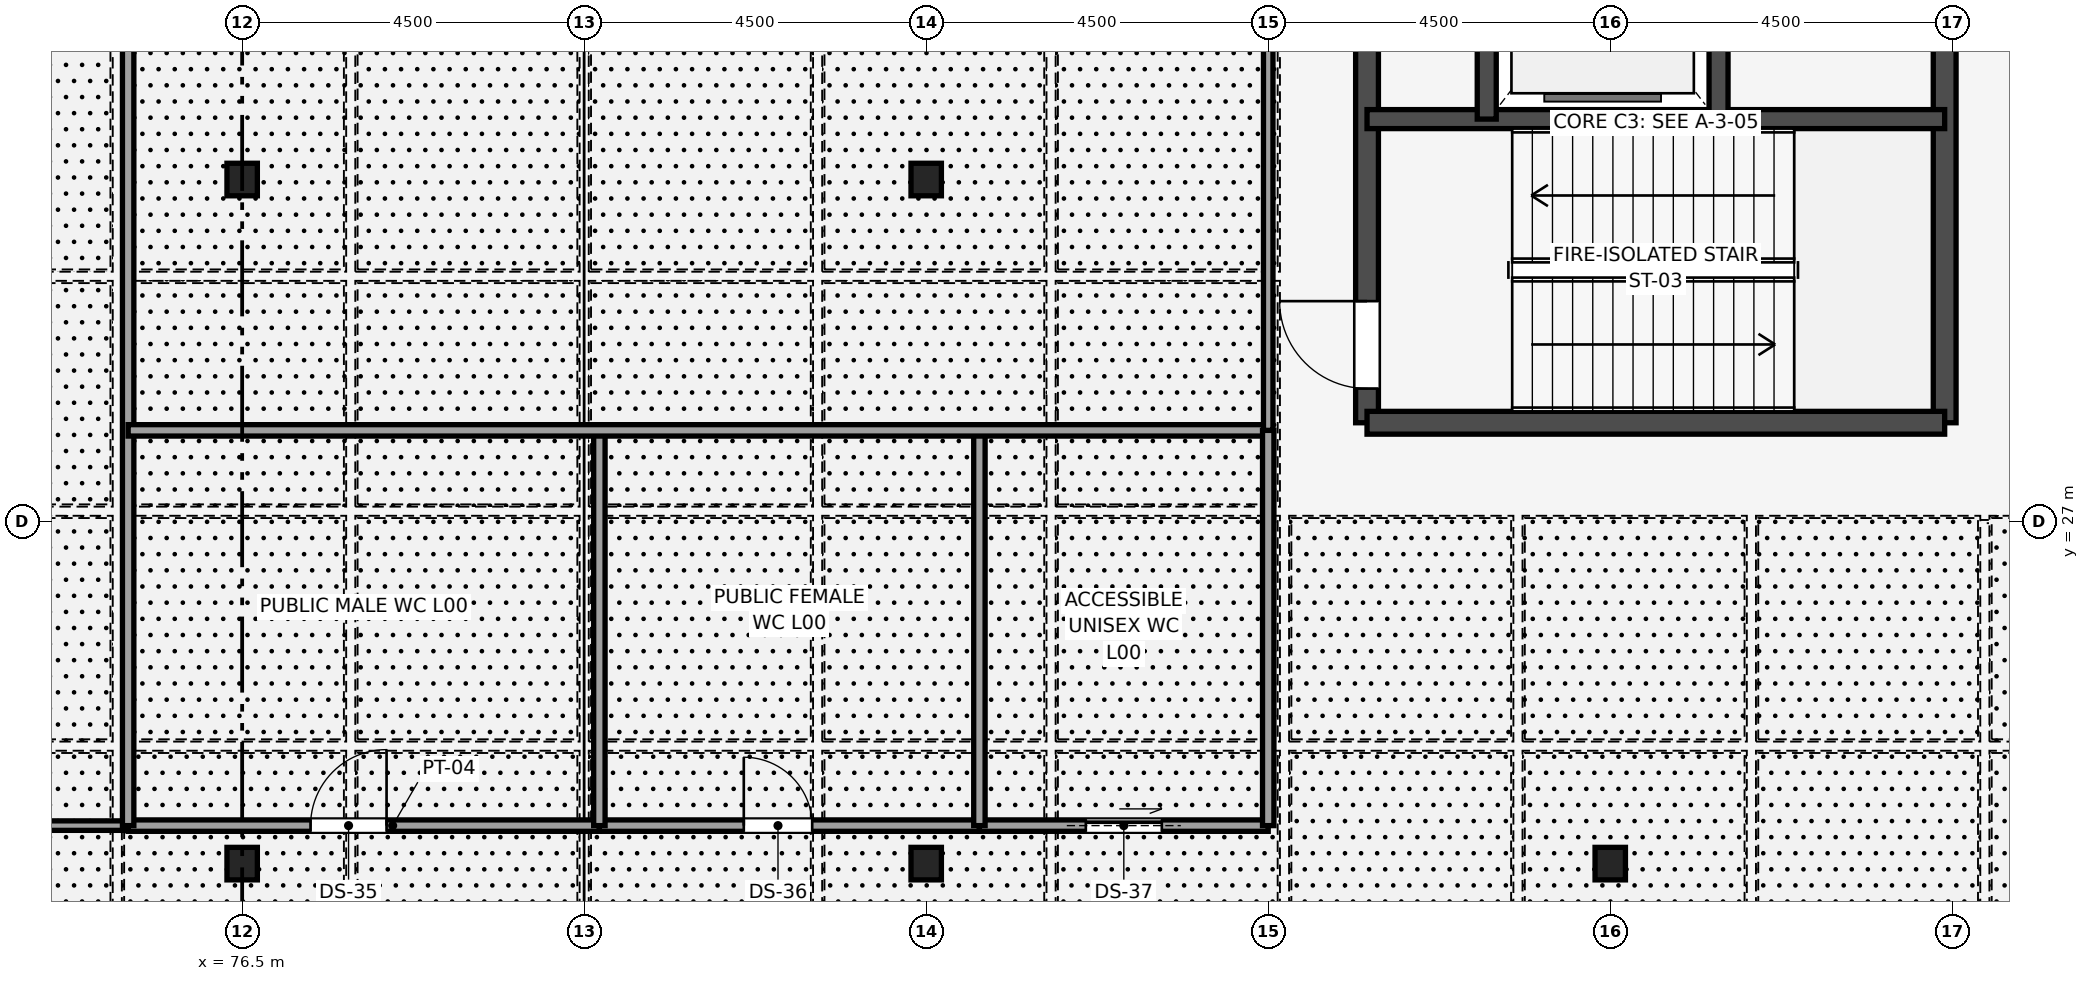
"""IFC4 building model, lengths in metres.
Left out: names, types, materials, properties, quantities, classifications, styles, units other than length and angle.
Written with IfcOpenShell. Run it as: python <this file> out.ifc"""

import sys

from ifc_helpers import new_model, si_unit, direction, frame, frame_2d, origin, origin_2d, place, context, subcontext, project, spatial, rectangle, i_section, extrude, element, fill, save


model = new_model("IFC4")
c1 = context("Model", 3, precision=1e-05, world=origin(), true_north=direction((0.0, 1.0)))
c2 = subcontext(c1, "Body", "Model", "MODEL_VIEW")
j1 = project(units=[si_unit("LENGTHUNIT", "METRE"), si_unit("PLANEANGLEUNIT", "RADIAN")], contexts=[c1])
p1 = place(None, origin())
s1 = spatial("IfcSite", under=j1, at=p1, CompositionType="ELEMENT")
p2 = place(p1, origin())
s2 = spatial("IfcBuilding", under=s1, at=p2, CompositionType="ELEMENT")
p3 = place(p2, origin())
s3 = spatial("IfcBuildingStorey", under=s2, at=p3, CompositionType="ELEMENT", Elevation=0.0)
for number, where, z_axis, x_axis in (
    (1, (76.5, 22.5, 0.0), (0.0, 0.0, 1.0), (1.0, 0.0, 0.0)),
    (2, (76.5, 31.5, 0.0), (0.0, 0.0, 1.0), (1.0, 0.0, 0.0)),
    (3, (85.5, 22.5, 0.0), (0.0, 0.0, 1.0), (1.0, 0.0, 0.0)),
    (4, (85.5, 31.5, 0.0), (0.0, 0.0, 1.0), (1.0, 0.0, 0.0)),
    (5, (94.5, 22.5, 0.0), (0.0, 0.0, 1.0), (1.0, 0.0, 0.0)),
):
    element("IfcColumn", number, at=place(p3, frame(where, z_axis=z_axis, x_axis=x_axis)), inside=s3, PredefinedType="COLUMN", context=c2, shape_type="SweptSolid", body=[
        extrude(i_section(OverallWidth=0.4, OverallDepth=0.428, WebThickness=0.02, FlangeThickness=0.028, FilletRadius=0.016, at=origin_2d()), origin(), (0.0, 0.0, 1.0), 5.4),
    ])
p4 = place(p3, frame((91.3, 28.3, 0.0), z_axis=(0.0, 0.0, 1.0), x_axis=(0.0, 1.0, 0.0)))
e6 = element("IfcWall", 6, at=p4, inside=s3, PredefinedType="SHEAR", context=c2, shape_type="SweptSolid", body=[
    extrude(rectangle(XDim=7.9, YDim=0.3, at=frame_2d((3.95, 0.0))), origin(), (0.0, 0.0, 1.0), 5.4),
])
p5 = place(p4, frame((0.45, 0.0, 0.0)))
e7 = element("IfcOpeningElement", 7, at=p5, cuts=e6, PredefinedType="OPENING", context=c2, shape_type="SweptSolid", body=[
    extrude(rectangle(XDim=1.15, YDim=2.15, at=frame_2d((0.575, 1.075))), frame((0.0, 0.16, 0.0), z_axis=(0.0, -1.0, 0.0), x_axis=(1.0, 0.0, 0.0)), (0.0, 0.0, 1.0), 0.32),
])
p6 = place(p3, frame((98.9, 28.3, 0.0), z_axis=(0.0, 0.0, 1.0), x_axis=(0.0, 1.0, 0.0)))
e8 = element("IfcWall", 8, at=p6, inside=s3, PredefinedType="SHEAR", context=c2, shape_type="SweptSolid", body=[
    extrude(rectangle(XDim=7.9, YDim=0.3, at=frame_2d((3.95, 0.0))), origin(), (0.0, 0.0, 1.0), 5.4),
])
p7 = place(p3, frame((91.3, 28.3, 0.0), z_axis=(0.0, 0.0, 1.0), x_axis=(1.0, 0.0, 0.0)))
e9 = element("IfcWall", 9, at=p7, inside=s3, PredefinedType="SHEAR", context=c2, shape_type="SweptSolid", body=[
    extrude(rectangle(XDim=7.6, YDim=0.3, at=frame_2d((3.8, 0.0))), origin(), (0.0, 0.0, 1.0), 5.4),
])
p8 = place(p3, frame((91.3, 32.295, 0.0), z_axis=(0.0, 0.0, 1.0), x_axis=(1.0, 0.0, 0.0)))
e10 = element("IfcWall", 10, at=p8, inside=s3, PredefinedType="SHEAR", context=c2, shape_type="SweptSolid", body=[
    extrude(rectangle(XDim=7.6, YDim=0.25, at=frame_2d((3.8, 0.0))), origin(), (0.0, 0.0, 1.0), 5.4),
])
for number, where, z_axis, x_axis in (
    (11, (92.875, 32.295, 0.0), (0.0, 0.0, 1.0), (0.0, 1.0, 0.0)),
    (12, (95.925, 32.295, 0.0), (0.0, 0.0, 1.0), (0.0, 1.0, 0.0)),
):
    element("IfcWall", number, at=place(p3, frame(where, z_axis=z_axis, x_axis=x_axis)), inside=s3, PredefinedType="SHEAR", context=c2, shape_type="SweptSolid", body=[
        extrude(rectangle(XDim=3.905, YDim=0.25, at=frame_2d((1.953, 0.0))), origin(), (0.0, 0.0, 1.0), 5.4),
    ])
p9 = place(p3, frame((58.5, 23.0, 0.0), z_axis=(0.0, 0.0, 1.0), x_axis=(1.0, 0.0, 0.0)))
e13 = element("IfcWall", 13, at=p9, inside=s3, PredefinedType="MOVABLE", context=c2, shape_type="SweptSolid", body=[
    extrude(rectangle(XDim=16.5, YDim=0.125, at=frame_2d((8.25, 0.0))), origin(), (0.0, 0.0, 1.0), 5.22),
])
p10 = place(p9, frame((5.5, 0.0, 0.0)))
e14 = element("IfcOpeningElement", 14, at=p10, cuts=e13, PredefinedType="OPENING", context=c2, shape_type="SweptSolid", body=[
    extrude(rectangle(XDim=2.06, YDim=2.475, at=frame_2d((1.03, 1.238))), frame((0.0, 0.073, 0.0), z_axis=(0.0, -1.0, 0.0), x_axis=(1.0, 0.0, 0.0)), (0.0, 0.0, 1.0), 0.145),
])
p11 = place(p3, frame((75.0, 23.0, 0.0), z_axis=(0.0, 0.0, 1.0), x_axis=(1.0, 0.0, 0.0)))
e15 = element("IfcWall", 15, at=p11, inside=s3, PredefinedType="PARTITIONING", context=c2, shape_type="SweptSolid", body=[
    extrude(rectangle(XDim=6.2, YDim=0.15, at=frame_2d((3.1, 0.0))), origin(), (0.0, 0.0, 1.0), 5.22),
])
p12 = place(p11, frame((2.4, 0.0, 0.0)))
e16 = element("IfcOpeningElement", 16, at=p12, cuts=e15, PredefinedType="OPENING", context=c2, shape_type="SweptSolid", body=[
    extrude(rectangle(XDim=1.0, YDim=2.225, at=frame_2d((0.5, 1.113))), frame((0.0, 0.085, 0.0), z_axis=(0.0, -1.0, 0.0), x_axis=(1.0, 0.0, 0.0)), (0.0, 0.0, 1.0), 0.17),
])
p13 = place(p3, frame((81.2, 23.0, 0.0), z_axis=(0.0, 0.0, 1.0), x_axis=(1.0, 0.0, 0.0)))
e17 = element("IfcWall", 17, at=p13, inside=s3, PredefinedType="PARTITIONING", context=c2, shape_type="SweptSolid", body=[
    extrude(rectangle(XDim=5.0, YDim=0.15, at=frame_2d((2.5, 0.0))), origin(), (0.0, 0.0, 1.0), 5.22),
])
p14 = place(p13, frame((1.9, 0.0, 0.0)))
e18 = element("IfcOpeningElement", 18, at=p14, cuts=e17, PredefinedType="OPENING", context=c2, shape_type="SweptSolid", body=[
    extrude(rectangle(XDim=0.9, YDim=2.25, at=frame_2d((0.45, 1.125))), frame((0.0, 0.085, 0.0), z_axis=(0.0, -1.0, 0.0), x_axis=(1.0, 0.0, 0.0)), (0.0, 0.0, 1.0), 0.17),
])
p15 = place(p3, frame((86.2, 23.0, 0.0), z_axis=(0.0, 0.0, 1.0), x_axis=(1.0, 0.0, 0.0)))
e19 = element("IfcWall", 19, at=p15, inside=s3, PredefinedType="PARTITIONING", context=c2, shape_type="SweptSolid", body=[
    extrude(rectangle(XDim=3.8, YDim=0.15, at=frame_2d((1.9, 0.0))), origin(), (0.0, 0.0, 1.0), 5.22),
])
p16 = place(p15, frame((1.4, 0.0, 0.0)))
e20 = element("IfcOpeningElement", 20, at=p16, cuts=e19, PredefinedType="OPENING", context=c2, shape_type="SweptSolid", body=[
    extrude(rectangle(XDim=1.0, YDim=2.25, at=frame_2d((0.5, 1.125))), frame((0.0, 0.085, 0.0), z_axis=(0.0, -1.0, 0.0), x_axis=(1.0, 0.0, 0.0)), (0.0, 0.0, 1.0), 0.17),
])
p17 = place(p3, frame((75.0, 23.0, 0.0), z_axis=(0.0, 0.0, 1.0), x_axis=(0.0, 1.0, 0.0)))
e21 = element("IfcWall", 21, at=p17, inside=s3, PredefinedType="PARTITIONING", context=c2, shape_type="SweptSolid", body=[
    extrude(rectangle(XDim=17.5, YDim=0.15, at=frame_2d((8.75, 0.0))), origin(), (0.0, 0.0, 1.0), 5.22),
])
for number, where, z_axis, x_axis in (
    (22, (81.2, 23.0, 0.0), (0.0, 0.0, 1.0), (0.0, 1.0, 0.0)),
    (23, (86.2, 23.0, 0.0), (0.0, 0.0, 1.0), (0.0, 1.0, 0.0)),
):
    element("IfcWall", number, at=place(p3, frame(where, z_axis=z_axis, x_axis=x_axis)), inside=s3, PredefinedType="PARTITIONING", context=c2, shape_type="SweptSolid", body=[
        extrude(rectangle(XDim=5.2, YDim=0.15, at=frame_2d((2.6, 0.0))), origin(), (0.0, 0.0, 1.0), 5.22),
    ])
p18 = place(p3, frame((75.0, 28.2, 0.0), z_axis=(0.0, 0.0, 1.0), x_axis=(1.0, 0.0, 0.0)))
e24 = element("IfcWall", 24, at=p18, inside=s3, PredefinedType="PARTITIONING", context=c2, shape_type="SweptSolid", body=[
    extrude(rectangle(XDim=15.0, YDim=0.15, at=frame_2d((7.5, 0.0))), origin(), (0.0, 0.0, 1.0), 5.22),
])
p19 = place(p3, frame((90.0, 23.0, 0.0), z_axis=(0.0, 0.0, 1.0), x_axis=(0.0, 1.0, 0.0)))
e25 = element("IfcWall", 25, at=p19, inside=s3, PredefinedType="PARTITIONING", context=c2, shape_type="SweptSolid", body=[
    extrude(rectangle(XDim=5.2, YDim=0.15, at=frame_2d((2.6, 0.0))), origin(), (0.0, 0.0, 1.0), 5.22),
])
p20 = place(p3, frame((90.0, 28.2, 0.0), z_axis=(0.0, 0.0, 1.0), x_axis=(0.0, 1.0, 0.0)))
e26 = element("IfcWall", 26, at=p20, inside=s3, PredefinedType="MOVABLE", context=c2, shape_type="SweptSolid", body=[
    extrude(rectangle(XDim=12.3, YDim=0.125, at=frame_2d((6.15, 0.0))), origin(), (0.0, 0.0, 1.0), 5.22),
])
p21 = place(p20, frame((5.2, 0.0, 0.0)))
e27 = element("IfcOpeningElement", 27, at=p21, cuts=e26, PredefinedType="OPENING", context=c2, shape_type="SweptSolid", body=[
    extrude(rectangle(XDim=2.02, YDim=2.5, at=frame_2d((1.01, 1.25))), frame((0.0, 0.073, 0.0), z_axis=(0.0, -1.0, 0.0), x_axis=(1.0, 0.0, 0.0)), (0.0, 0.0, 1.0), 0.145),
])
p22 = place(p5, origin())
e28 = element("IfcDoor", 28, at=p22, inside=s3, OperationType="SINGLE_SWING_RIGHT", PredefinedType="DOOR", context=c2, shape_type="SweptSolid", body=[
    extrude(rectangle(XDim=1.15, YDim=2.15, at=frame_2d((0.575, 1.075))), frame((0.0, 0.025, 0.0), z_axis=(0.0, -1.0, 0.0), x_axis=(1.0, 0.0, 0.0)), (0.0, 0.0, 1.0), 0.05),
])
fill(e7, e28)
p23 = place(p12, origin())
e29 = element("IfcDoor", 29, at=p23, inside=s3, OperationType="SINGLE_SWING_RIGHT", PredefinedType="DOOR", context=c2, shape_type="SweptSolid", body=[
    extrude(rectangle(XDim=1.0, YDim=2.225, at=frame_2d((0.5, 1.113))), frame((0.0, 0.025, 0.0), z_axis=(0.0, -1.0, 0.0), x_axis=(1.0, 0.0, 0.0)), (0.0, 0.0, 1.0), 0.05),
])
fill(e16, e29)
p24 = place(p14, origin())
e30 = element("IfcDoor", 30, at=p24, inside=s3, OperationType="SINGLE_SWING_LEFT", PredefinedType="DOOR", context=c2, shape_type="SweptSolid", body=[
    extrude(rectangle(XDim=0.9, YDim=2.25, at=frame_2d((0.45, 1.125))), frame((0.0, 0.025, 0.0), z_axis=(0.0, -1.0, 0.0), x_axis=(1.0, 0.0, 0.0)), (0.0, 0.0, 1.0), 0.05),
])
fill(e18, e30)
p25 = place(p16, origin())
e31 = element("IfcDoor", 31, at=p25, inside=s3, OperationType="SLIDING_TO_LEFT", PredefinedType="DOOR", context=c2, shape_type="SweptSolid", body=[
    extrude(rectangle(XDim=1.0, YDim=2.25, at=frame_2d((0.5, 1.125))), frame((0.0, 0.025, 0.0), z_axis=(0.0, -1.0, 0.0), x_axis=(1.0, 0.0, 0.0)), (0.0, 0.0, 1.0), 0.05),
])
fill(e20, e31)
save(model, sys.argv[1])
